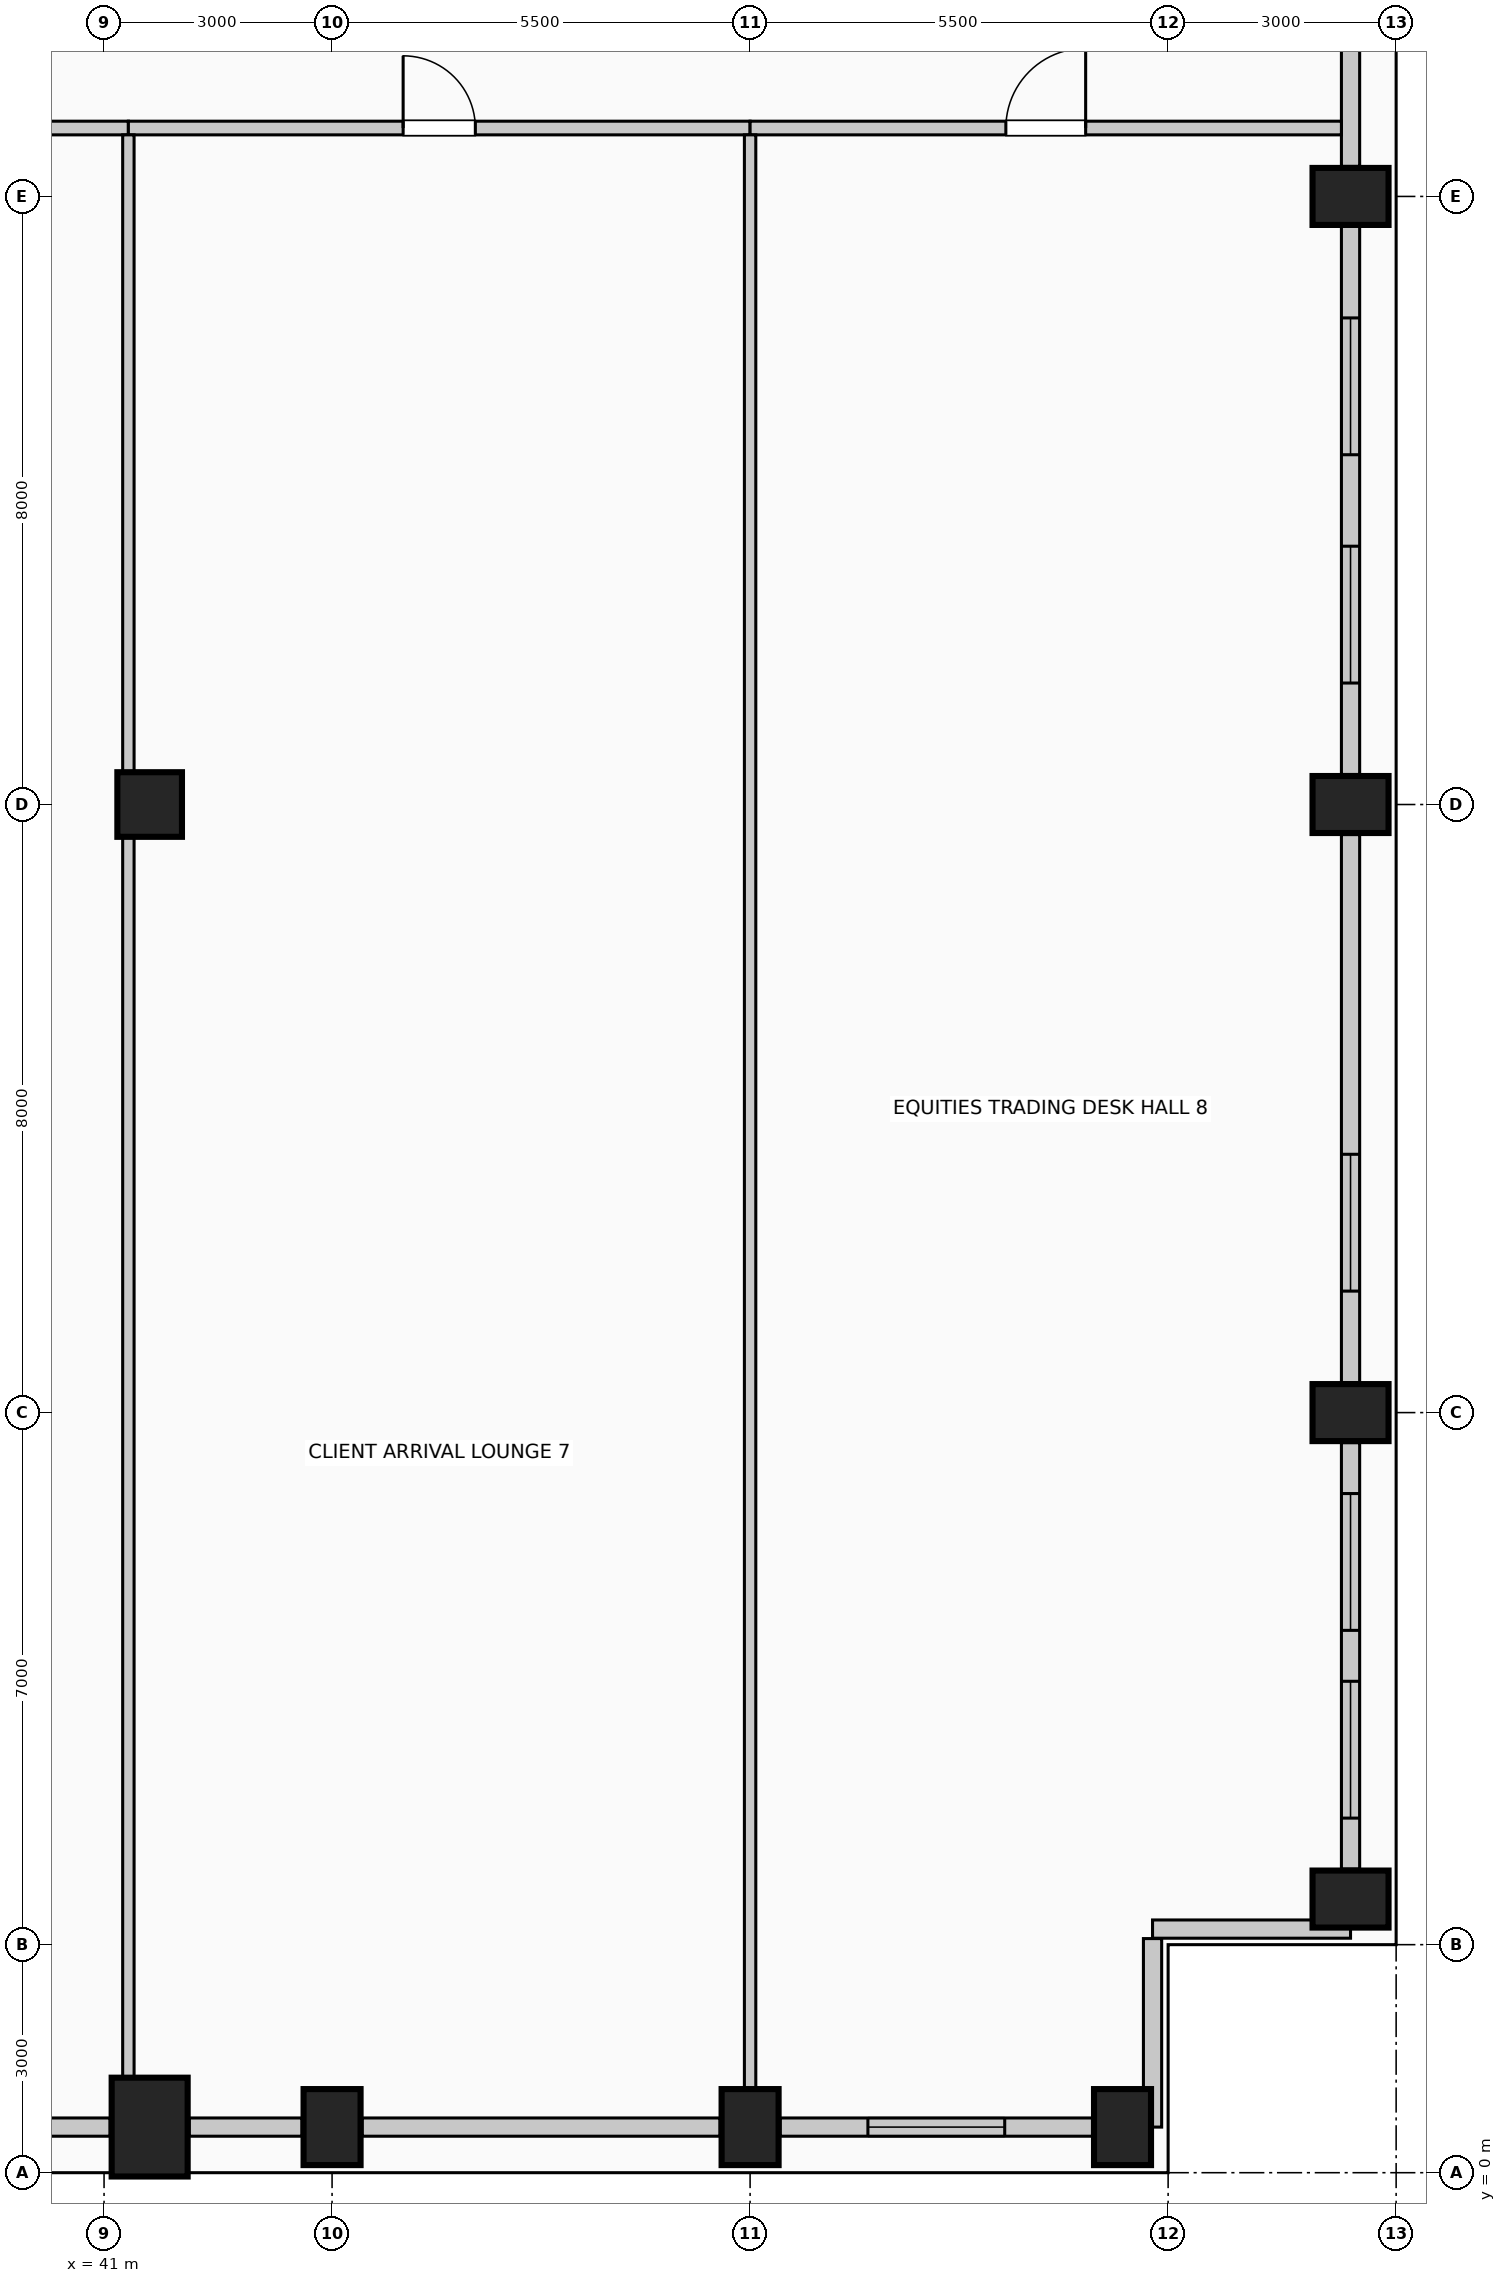
"""IFC4 building model, lengths in metres.
Left out: names, types, materials, properties, quantities, classifications, styles, units other than length and angle.
Written with IfcOpenShell. Run it as: python <this file> out.ifc"""

import sys

from ifc_helpers import new_model, si_unit, direction, frame, frame_2d, origin, origin_2d, place, context, subcontext, project, spatial, rectangle, circle, extrude, element, fill, save


model = new_model("IFC4")
c1 = context("Model", 3, precision=1e-05, world=origin(), true_north=direction((0.0, 1.0)))
c2 = subcontext(c1, "Body", "Model", "MODEL_VIEW")
j1 = project(units=[si_unit("LENGTHUNIT", "METRE"), si_unit("PLANEANGLEUNIT", "RADIAN")], contexts=[c1])
p1 = place(None, origin())
s1 = spatial("IfcSite", under=j1, at=p1, CompositionType="ELEMENT")
p2 = place(p1, origin())
s2 = spatial("IfcBuilding", under=s1, at=p2, CompositionType="ELEMENT")
p3 = place(p2, frame((0.0, 0.0, 248.6)))
s3 = spatial("IfcBuildingStorey", under=s2, at=p3, CompositionType="ELEMENT", Elevation=248.6)
p4 = place(p3, frame((41.6, 0.6, 0.0), z_axis=(0.0, 0.0, 1.0), x_axis=(1.0, 0.0, 0.0)))
e1 = element("IfcColumn", 1, at=p4, inside=s3, PredefinedType="COLUMN", context=c2, shape_type="SweptSolid", body=[
    extrude(rectangle(XDim=1.0, YDim=1.3, at=origin_2d()), origin(), (0.0, 0.0, 1.0), 4.0),
])
for number, where, z_axis, x_axis in (
    (2, (44.0, 0.6, 0.0), (0.0, 0.0, 1.0), (1.0, 0.0, 0.0)),
    (3, (49.5, 0.6, 0.0), (0.0, 0.0, 1.0), (1.0, 0.0, 0.0)),
    (4, (54.4, 0.6, 0.0), (0.0, 0.0, 1.0), (1.0, 0.0, 0.0)),
    (5, (57.4, 3.6, 0.0), (0.0, 0.0, 1.0), (0.0, 1.0, 0.0)),
    (6, (57.4, 10.0, 0.0), (0.0, 0.0, 1.0), (0.0, 1.0, 0.0)),
    (7, (57.4, 18.0, 0.0), (0.0, 0.0, 1.0), (0.0, 1.0, 0.0)),
    (8, (57.4, 26.0, 0.0), (0.0, 0.0, 1.0), (0.0, 1.0, 0.0)),
):
    element("IfcColumn", number, at=place(p3, frame(where, z_axis=z_axis, x_axis=x_axis)), inside=s3, PredefinedType="COLUMN", context=c2, shape_type="SweptSolid", body=[
        extrude(rectangle(XDim=0.75, YDim=1.0, at=origin_2d()), origin(), (0.0, 0.0, 1.0), 4.0),
    ])
p5 = place(p3, frame((41.6, 18.0, 0.0), z_axis=(0.0, 0.0, 1.0), x_axis=(1.0, 0.0, 0.0)))
e9 = element("IfcColumn", 9, at=p5, inside=s3, PredefinedType="COLUMN", context=c2, shape_type="SweptSolid", body=[
    extrude(circle(Radius=0.425, at=origin_2d()), origin(), (0.0, 0.0, 1.0), 4.0),
])
p6 = place(p3, frame((41.08, 0.6, 0.0), z_axis=(0.0, 0.0, 1.0), x_axis=(-1.0, 0.0, 0.0)))
e10 = element("IfcWall", 10, at=p6, inside=s3, PredefinedType="SOLIDWALL", context=c2, shape_type="SweptSolid", body=[
    extrude(rectangle(XDim=6.56, YDim=0.24, at=frame_2d((3.28, 0.0))), origin(), (0.0, 0.0, 1.0), 3.0),
])
p7 = place(p6, frame((0.987, 0.0, 0.42)))
e11 = element("IfcOpeningElement", 11, at=p7, cuts=e10, PredefinedType="OPENING", context=c2, shape_type="SweptSolid", body=[
    extrude(rectangle(XDim=1.8, YDim=2.2, at=frame_2d((0.9, 1.1))), frame((0.0, 0.13, 0.0), z_axis=(0.0, -1.0, 0.0), x_axis=(1.0, 0.0, 0.0)), (0.0, 0.0, 1.0), 0.26),
])
p8 = place(p6, frame((3.773, 0.0, 0.42)))
e12 = element("IfcOpeningElement", 12, at=p8, cuts=e10, PredefinedType="OPENING", context=c2, shape_type="SweptSolid", body=[
    extrude(rectangle(XDim=1.8, YDim=2.2, at=frame_2d((0.9, 1.1))), frame((0.0, 0.13, 0.0), z_axis=(0.0, -1.0, 0.0), x_axis=(1.0, 0.0, 0.0)), (0.0, 0.0, 1.0), 0.26),
])
p9 = place(p3, frame((43.605, 0.6, 0.0), z_axis=(0.0, 0.0, 1.0), x_axis=(-1.0, 0.0, 0.0)))
e13 = element("IfcWall", 13, at=p9, inside=s3, PredefinedType="SOLIDWALL", context=c2, shape_type="SweptSolid", body=[
    extrude(rectangle(XDim=1.485, YDim=0.24, at=frame_2d((0.742, 0.0))), origin(), (0.0, 0.0, 1.0), 3.0),
])
p10 = place(p3, frame((49.105, 0.6, 0.0), z_axis=(0.0, 0.0, 1.0), x_axis=(-1.0, 0.0, 0.0)))
e14 = element("IfcWall", 14, at=p10, inside=s3, PredefinedType="SOLIDWALL", context=c2, shape_type="SweptSolid", body=[
    extrude(rectangle(XDim=4.71, YDim=0.24, at=frame_2d((2.355, 0.0))), origin(), (0.0, 0.0, 1.0), 3.0),
])
p11 = place(p3, frame((54.005, 0.6, 0.0), z_axis=(0.0, 0.0, 1.0), x_axis=(-1.0, 0.0, 0.0)))
e15 = element("IfcWall", 15, at=p11, inside=s3, PredefinedType="SOLIDWALL", context=c2, shape_type="SweptSolid", body=[
    extrude(rectangle(XDim=4.11, YDim=0.24, at=frame_2d((2.055, 0.0))), origin(), (0.0, 0.0, 1.0), 3.0),
])
p12 = place(p11, frame((1.155, 0.0, 0.42)))
e16 = element("IfcOpeningElement", 16, at=p12, cuts=e15, PredefinedType="OPENING", context=c2, shape_type="SweptSolid", body=[
    extrude(rectangle(XDim=1.8, YDim=2.2, at=frame_2d((0.9, 1.1))), frame((0.0, 0.13, 0.0), z_axis=(0.0, -1.0, 0.0), x_axis=(1.0, 0.0, 0.0)), (0.0, 0.0, 1.0), 0.26),
])
p13 = place(p3, frame((57.4, 9.605, 0.0), z_axis=(0.0, 0.0, 1.0), x_axis=(0.0, -1.0, 0.0)))
e17 = element("IfcWall", 17, at=p13, inside=s3, PredefinedType="SOLIDWALL", context=c2, shape_type="SweptSolid", body=[
    extrude(rectangle(XDim=5.61, YDim=0.24, at=frame_2d((2.805, 0.0))), origin(), (0.0, 0.0, 1.0), 3.0),
])
p14 = place(p13, frame((0.67, 0.0, 0.42)))
e18 = element("IfcOpeningElement", 18, at=p14, cuts=e17, PredefinedType="OPENING", context=c2, shape_type="SweptSolid", body=[
    extrude(rectangle(XDim=1.8, YDim=2.2, at=frame_2d((0.9, 1.1))), frame((0.0, 0.13, 0.0), z_axis=(0.0, -1.0, 0.0), x_axis=(1.0, 0.0, 0.0)), (0.0, 0.0, 1.0), 0.26),
])
p15 = place(p13, frame((3.14, 0.0, 0.42)))
e19 = element("IfcOpeningElement", 19, at=p15, cuts=e17, PredefinedType="OPENING", context=c2, shape_type="SweptSolid", body=[
    extrude(rectangle(XDim=1.8, YDim=2.2, at=frame_2d((0.9, 1.1))), frame((0.0, 0.13, 0.0), z_axis=(0.0, -1.0, 0.0), x_axis=(1.0, 0.0, 0.0)), (0.0, 0.0, 1.0), 0.26),
])
p16 = place(p3, frame((57.4, 17.605, 0.0), z_axis=(0.0, 0.0, 1.0), x_axis=(0.0, -1.0, 0.0)))
e20 = element("IfcWall", 20, at=p16, inside=s3, PredefinedType="SOLIDWALL", context=c2, shape_type="SweptSolid", body=[
    extrude(rectangle(XDim=7.21, YDim=0.24, at=frame_2d((3.605, 0.0))), origin(), (0.0, 0.0, 1.0), 3.0),
])
p17 = place(p16, frame((4.207, 0.0, 0.42)))
e21 = element("IfcOpeningElement", 21, at=p17, cuts=e20, PredefinedType="OPENING", context=c2, shape_type="SweptSolid", body=[
    extrude(rectangle(XDim=1.8, YDim=2.2, at=frame_2d((0.9, 1.1))), frame((0.0, 0.13, 0.0), z_axis=(0.0, -1.0, 0.0), x_axis=(1.0, 0.0, 0.0)), (0.0, 0.0, 1.0), 0.26),
])
p18 = place(p3, frame((57.4, 25.605, 0.0), z_axis=(0.0, 0.0, 1.0), x_axis=(0.0, -1.0, 0.0)))
e22 = element("IfcWall", 22, at=p18, inside=s3, PredefinedType="SOLIDWALL", context=c2, shape_type="SweptSolid", body=[
    extrude(rectangle(XDim=7.21, YDim=0.24, at=frame_2d((3.605, 0.0))), origin(), (0.0, 0.0, 1.0), 3.0),
])
p19 = place(p18, frame((1.203, 0.0, 0.42)))
e23 = element("IfcOpeningElement", 23, at=p19, cuts=e22, PredefinedType="OPENING", context=c2, shape_type="SweptSolid", body=[
    extrude(rectangle(XDim=1.8, YDim=2.2, at=frame_2d((0.9, 1.1))), frame((0.0, 0.13, 0.0), z_axis=(0.0, -1.0, 0.0), x_axis=(1.0, 0.0, 0.0)), (0.0, 0.0, 1.0), 0.26),
])
p20 = place(p18, frame((4.207, 0.0, 0.42)))
e24 = element("IfcOpeningElement", 24, at=p20, cuts=e22, PredefinedType="OPENING", context=c2, shape_type="SweptSolid", body=[
    extrude(rectangle(XDim=1.8, YDim=2.2, at=frame_2d((0.9, 1.1))), frame((0.0, 0.13, 0.0), z_axis=(0.0, -1.0, 0.0), x_axis=(1.0, 0.0, 0.0)), (0.0, 0.0, 1.0), 0.26),
])
p21 = place(p3, frame((57.4, 33.605, 0.0), z_axis=(0.0, 0.0, 1.0), x_axis=(0.0, -1.0, 0.0)))
e25 = element("IfcWall", 25, at=p21, inside=s3, PredefinedType="SOLIDWALL", context=c2, shape_type="SweptSolid", body=[
    extrude(rectangle(XDim=7.21, YDim=0.24, at=frame_2d((3.605, 0.0))), origin(), (0.0, 0.0, 1.0), 3.0),
])
p22 = place(p3, frame((57.4, 3.205, 0.0), z_axis=(0.0, 0.0, 1.0), x_axis=(-1.0, 0.0, 0.0)))
e26 = element("IfcWall", 26, at=p22, inside=s3, PredefinedType="SOLIDWALL", context=c2, shape_type="SweptSolid", body=[
    extrude(rectangle(XDim=2.605, YDim=0.24, at=frame_2d((1.302, 0.0))), origin(), (0.0, 0.0, 1.0), 3.75),
])
p23 = place(p3, frame((54.795, 3.08, 0.0), z_axis=(0.0, 0.0, 1.0), x_axis=(0.0, -1.0, 0.0)))
e27 = element("IfcWall", 27, at=p23, inside=s3, PredefinedType="SOLIDWALL", context=c2, shape_type="SweptSolid", body=[
    extrude(rectangle(XDim=2.48, YDim=0.24, at=frame_2d((1.24, 0.0))), origin(), (0.0, 0.0, 1.0), 3.75),
])
p24 = place(p3, frame((32.12, 26.9, 0.0), z_axis=(0.0, 0.0, 1.0), x_axis=(1.0, 0.0, 0.0)))
e28 = element("IfcWall", 28, at=p24, inside=s3, PredefinedType="PARTITIONING", context=c2, shape_type="SweptSolid", body=[
    extrude(rectangle(XDim=9.2, YDim=0.18, at=frame_2d((4.6, 0.0))), origin(), (0.0, 0.0, 1.0), 3.75),
])
p25 = place(p24, frame((4.075, 0.0, 0.0)))
e29 = element("IfcOpeningElement", 29, at=p25, cuts=e28, PredefinedType="OPENING", context=c2, shape_type="SweptSolid", body=[
    extrude(rectangle(XDim=1.05, YDim=2.15, at=frame_2d((0.525, 1.075))), frame((0.0, 0.1, 0.0), z_axis=(0.0, -1.0, 0.0), x_axis=(1.0, 0.0, 0.0)), (0.0, 0.0, 1.0), 0.2),
])
p26 = place(p3, frame((41.32, 26.9, 0.0), z_axis=(0.0, 0.0, 1.0), x_axis=(1.0, 0.0, 0.0)))
e30 = element("IfcWall", 30, at=p26, inside=s3, PredefinedType="PARTITIONING", context=c2, shape_type="SweptSolid", body=[
    extrude(rectangle(XDim=8.18, YDim=0.18, at=frame_2d((4.09, 0.0))), origin(), (0.0, 0.0, 1.0), 3.75),
])
p27 = place(p26, frame((3.615, 0.0, 0.0)))
e31 = element("IfcOpeningElement", 31, at=p27, cuts=e30, PredefinedType="OPENING", context=c2, shape_type="SweptSolid", body=[
    extrude(rectangle(XDim=0.95, YDim=2.15, at=frame_2d((0.475, 1.075))), frame((0.0, 0.1, 0.0), z_axis=(0.0, -1.0, 0.0), x_axis=(1.0, 0.0, 0.0)), (0.0, 0.0, 1.0), 0.2),
])
p28 = place(p3, frame((49.5, 26.9, 0.0), z_axis=(0.0, 0.0, 1.0), x_axis=(1.0, 0.0, 0.0)))
e32 = element("IfcWall", 32, at=p28, inside=s3, PredefinedType="PARTITIONING", context=c2, shape_type="SweptSolid", body=[
    extrude(rectangle(XDim=7.78, YDim=0.18, at=frame_2d((3.89, 0.0))), origin(), (0.0, 0.0, 1.0), 3.75),
])
p29 = place(p28, frame((3.365, 0.0, 0.0)))
e33 = element("IfcOpeningElement", 33, at=p29, cuts=e32, PredefinedType="OPENING", context=c2, shape_type="SweptSolid", body=[
    extrude(rectangle(XDim=1.05, YDim=2.15, at=frame_2d((0.525, 1.075))), frame((0.0, 0.1, 0.0), z_axis=(0.0, -1.0, 0.0), x_axis=(1.0, 0.0, 0.0)), (0.0, 0.0, 1.0), 0.2),
])
p30 = place(p3, frame((41.32, 1.25, 0.0), z_axis=(0.0, 0.0, 1.0), x_axis=(0.0, 1.0, 0.0)))
e34 = element("IfcWall", 34, at=p30, inside=s3, PredefinedType="PARTITIONING", context=c2, shape_type="SweptSolid", body=[
    extrude(rectangle(XDim=16.325, YDim=0.15, at=frame_2d((8.163, 0.0))), origin(), (0.0, 0.0, 1.0), 3.195),
])
p31 = place(p3, frame((41.32, 18.425, 0.0), z_axis=(0.0, 0.0, 1.0), x_axis=(0.0, 1.0, 0.0)))
e35 = element("IfcWall", 35, at=p31, inside=s3, PredefinedType="PARTITIONING", context=c2, shape_type="SweptSolid", body=[
    extrude(rectangle(XDim=8.385, YDim=0.15, at=frame_2d((4.192, 0.0))), origin(), (0.0, 0.0, 1.0), 3.195),
])
p32 = place(p3, frame((49.5, 1.1, 0.0), z_axis=(0.0, 0.0, 1.0), x_axis=(0.0, 1.0, 0.0)))
e36 = element("IfcWall", 36, at=p32, inside=s3, PredefinedType="PARTITIONING", context=c2, shape_type="SweptSolid", body=[
    extrude(rectangle(XDim=25.71, YDim=0.15, at=frame_2d((12.855, 0.0))), origin(), (0.0, 0.0, 1.0), 3.75),
])
p33 = place(p12, origin())
e37 = element("IfcWindow", 37, at=p33, inside=s3, PartitioningType="SINGLE_PANEL", PredefinedType="WINDOW", context=c2, shape_type="SweptSolid", body=[
    extrude(rectangle(XDim=1.8, YDim=2.2, at=frame_2d((0.9, 1.1))), frame((0.0, 0.03, 0.0), z_axis=(0.0, -1.0, 0.0), x_axis=(1.0, 0.0, 0.0)), (0.0, 0.0, 1.0), 0.06),
])
fill(e16, e37)
p34 = place(p14, origin())
e38 = element("IfcWindow", 38, at=p34, inside=s3, PartitioningType="SINGLE_PANEL", PredefinedType="WINDOW", context=c2, shape_type="SweptSolid", body=[
    extrude(rectangle(XDim=1.8, YDim=2.2, at=frame_2d((0.9, 1.1))), frame((0.0, 0.03, 0.0), z_axis=(0.0, -1.0, 0.0), x_axis=(1.0, 0.0, 0.0)), (0.0, 0.0, 1.0), 0.06),
])
fill(e18, e38)
p35 = place(p15, origin())
e39 = element("IfcWindow", 39, at=p35, inside=s3, PartitioningType="SINGLE_PANEL", PredefinedType="WINDOW", context=c2, shape_type="SweptSolid", body=[
    extrude(rectangle(XDim=1.8, YDim=2.2, at=frame_2d((0.9, 1.1))), frame((0.0, 0.03, 0.0), z_axis=(0.0, -1.0, 0.0), x_axis=(1.0, 0.0, 0.0)), (0.0, 0.0, 1.0), 0.06),
])
fill(e19, e39)
p36 = place(p17, origin())
e40 = element("IfcWindow", 40, at=p36, inside=s3, PartitioningType="SINGLE_PANEL", PredefinedType="WINDOW", context=c2, shape_type="SweptSolid", body=[
    extrude(rectangle(XDim=1.8, YDim=2.2, at=frame_2d((0.9, 1.1))), frame((0.0, 0.03, 0.0), z_axis=(0.0, -1.0, 0.0), x_axis=(1.0, 0.0, 0.0)), (0.0, 0.0, 1.0), 0.06),
])
fill(e21, e40)
p37 = place(p19, origin())
e41 = element("IfcWindow", 41, at=p37, inside=s3, PartitioningType="SINGLE_PANEL", PredefinedType="WINDOW", context=c2, shape_type="SweptSolid", body=[
    extrude(rectangle(XDim=1.8, YDim=2.2, at=frame_2d((0.9, 1.1))), frame((0.0, 0.03, 0.0), z_axis=(0.0, -1.0, 0.0), x_axis=(1.0, 0.0, 0.0)), (0.0, 0.0, 1.0), 0.06),
])
fill(e23, e41)
p38 = place(p20, origin())
e42 = element("IfcWindow", 42, at=p38, inside=s3, PartitioningType="SINGLE_PANEL", PredefinedType="WINDOW", context=c2, shape_type="SweptSolid", body=[
    extrude(rectangle(XDim=1.8, YDim=2.2, at=frame_2d((0.9, 1.1))), frame((0.0, 0.03, 0.0), z_axis=(0.0, -1.0, 0.0), x_axis=(1.0, 0.0, 0.0)), (0.0, 0.0, 1.0), 0.06),
])
fill(e24, e42)
p39 = place(p27, origin())
e43 = element("IfcDoor", 43, at=p39, inside=s3, OperationType="SINGLE_SWING_LEFT", PredefinedType="DOOR", context=c2, shape_type="SweptSolid", body=[
    extrude(rectangle(XDim=0.95, YDim=2.15, at=frame_2d((0.475, 1.075))), frame((0.0, 0.025, 0.0), z_axis=(0.0, -1.0, 0.0), x_axis=(1.0, 0.0, 0.0)), (0.0, 0.0, 1.0), 0.05),
])
fill(e31, e43)
p40 = place(p29, origin())
e44 = element("IfcDoor", 44, at=p40, inside=s3, OperationType="SINGLE_SWING_RIGHT", PredefinedType="DOOR", context=c2, shape_type="SweptSolid", body=[
    extrude(rectangle(XDim=1.05, YDim=2.15, at=frame_2d((0.525, 1.075))), frame((0.0, 0.025, 0.0), z_axis=(0.0, -1.0, 0.0), x_axis=(1.0, 0.0, 0.0)), (0.0, 0.0, 1.0), 0.05),
])
fill(e33, e44)
save(model, sys.argv[1])
